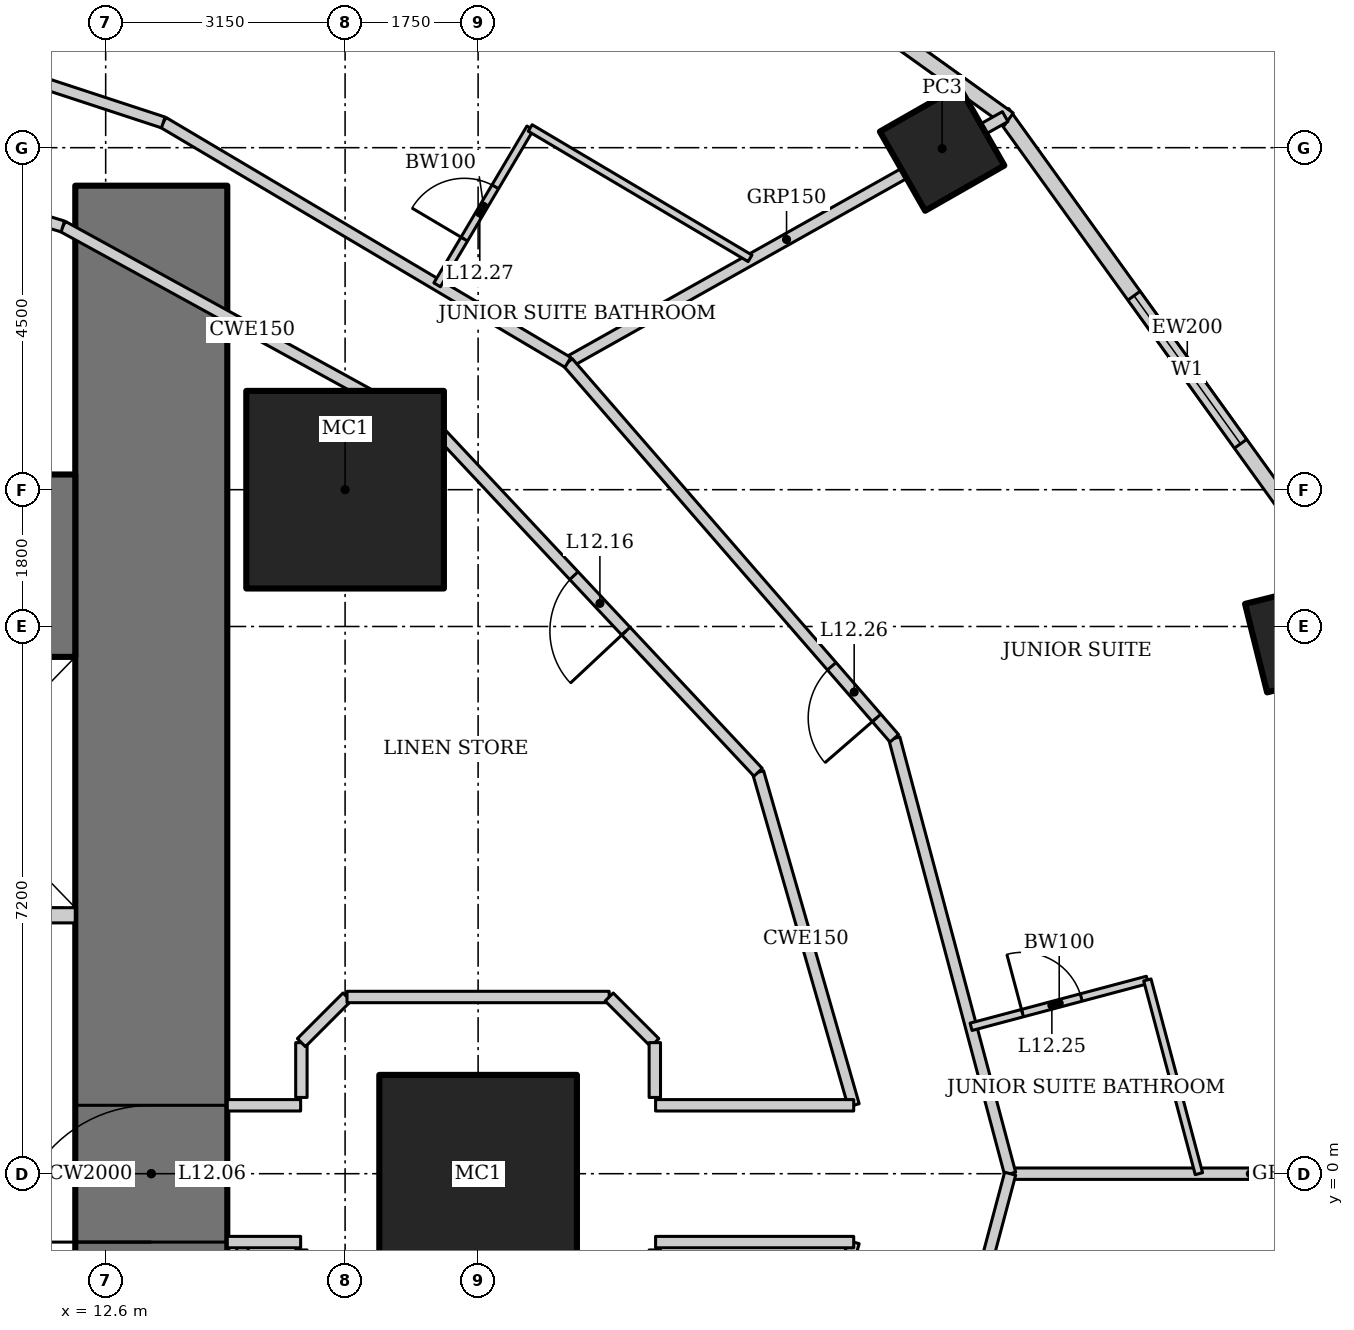
"""IFC4 building model, lengths in metres.
Left out: names, types, materials, properties, quantities, classifications, styles, units other than length and angle.
Written with IfcOpenShell. Run it as: python <this file> out.ifc"""

import sys

from ifc_helpers import new_model, si_unit, direction, frame, frame_2d, origin, origin_2d, place, context, subcontext, project, spatial, rectangle, hollow_rectangle, extrude, element, fill, save


model = new_model("IFC4")
c1 = context("Model", 3, precision=1e-05, world=origin(), true_north=direction((0.0, 1.0)))
c2 = subcontext(c1, "Body", "Model", "MODEL_VIEW")
j1 = project(units=[si_unit("LENGTHUNIT", "METRE"), si_unit("PLANEANGLEUNIT", "RADIAN")], contexts=[c1])
p1 = place(None, origin())
s1 = spatial("IfcSite", under=j1, at=p1, CompositionType="ELEMENT")
p2 = place(p1, origin())
s2 = spatial("IfcBuilding", under=s1, at=p2, CompositionType="ELEMENT")
p3 = place(p2, frame((0.0, 0.0, 58.6)))
s3 = spatial("IfcBuildingStorey", under=s2, at=p3, CompositionType="ELEMENT", Elevation=58.6)
for number, where, z_axis, x_axis in (
    (1, (17.5, 0.0, 0.0), (0.0, 0.0, 1.0), (1.0, 0.0, 0.0)),
    (2, (15.75, 9.0, 0.0), (0.0, 0.0, 1.0), (1.0, 0.0, 0.0)),
):
    element("IfcColumn", number, at=place(p3, frame(where, z_axis=z_axis, x_axis=x_axis)), inside=s3, PredefinedType="COLUMN", context=c2, shape_type="SweptSolid", body=[
        extrude(hollow_rectangle(XDim=2.6, YDim=2.6, WallThickness=0.13, at=origin_2d()), origin(), (0.0, 0.0, 1.0), 3.6),
    ])
p4 = place(p3, frame((28.318, 7.06, 0.0), z_axis=(0.0, 0.0, 1.0), x_axis=(0.970295726276, 0.2419218956, 0.0)))
e3 = element("IfcColumn", 3, at=p4, inside=s3, PredefinedType="COLUMN", context=c2, shape_type="SweptSolid", body=[
    extrude(hollow_rectangle(XDim=1.2, YDim=1.2, WallThickness=0.1, at=origin_2d()), origin(), (0.0, 0.0, 1.0), 3.6),
])
p5 = place(p3, frame((23.605, 13.489, 0.0), z_axis=(0.0, 0.0, 1.0), x_axis=(0.86824298017, 0.496139221777, 0.0)))
e4 = element("IfcColumn", 4, at=p5, inside=s3, PredefinedType="COLUMN", context=c2, shape_type="SweptSolid", body=[
    extrude(hollow_rectangle(XDim=1.2, YDim=1.2, WallThickness=0.12, at=origin_2d()), origin(), (0.0, 0.0, 1.0), 3.6),
])
p6 = place(p3, frame((13.2, -13.0, 0.0), z_axis=(0.0, 0.0, 1.0), x_axis=(0.0, 1.0, 0.0)))
e5 = element("IfcWall", 5, at=p6, inside=s3, PredefinedType="SHEAR", context=c2, shape_type="SweptSolid", body=[
    extrude(rectangle(XDim=26.0, YDim=2.0, at=frame_2d((13.0, 0.0))), origin(), (0.0, 0.0, 1.0), 3.6),
])
p7 = place(p6, frame((12.1, 0.0, 0.0)))
e6 = element("IfcOpeningElement", 6, at=p7, cuts=e5, PredefinedType="OPENING", context=c2, shape_type="SweptSolid", body=[
    extrude(rectangle(XDim=1.8, YDim=2.1, at=frame_2d((0.9, 1.05))), frame((0.0, 1.01, 0.0), z_axis=(0.0, -1.0, 0.0), x_axis=(1.0, 0.0, 0.0)), (0.0, 0.0, 1.0), 2.02),
])
p8 = place(p3, frame((12.2, 8.0, 0.0), z_axis=(0.0, 0.0, 1.0), x_axis=(-1.0, 0.0, 0.0)))
e7 = element("IfcWall", 7, at=p8, inside=s3, PredefinedType="SHEAR", context=c2, shape_type="SweptSolid", body=[
    extrude(rectangle(XDim=24.4, YDim=2.4, at=frame_2d((12.2, 0.0))), origin(), (0.0, 0.0, 1.0), 3.6),
])
p9 = place(p3, frame((12.2, 3.4, 0.0), z_axis=(0.0, 0.0, 1.0), x_axis=(-1.0, 0.0, 0.0)))
e8 = element("IfcWall", 8, at=p9, inside=s3, PredefinedType="SOLIDWALL", context=c2, shape_type="SweptSolid", body=[
    extrude(rectangle(XDim=6.6, YDim=0.2, at=frame_2d((3.3, 0.0))), origin(), (0.0, 0.0, 1.0), 3.6),
])
p10 = place(p9, frame((4.45, 0.0, 0.0)))
e9 = element("IfcOpeningElement", 9, at=p10, cuts=e8, PredefinedType="OPENING", context=c2, shape_type="SweptSolid", body=[
    extrude(rectangle(XDim=1.1, YDim=2.2, at=frame_2d((0.55, 1.1))), frame((0.0, 0.11, 0.0), z_axis=(0.0, -1.0, 0.0), x_axis=(1.0, 0.0, 0.0)), (0.0, 0.0, 1.0), 0.22),
])
p11 = place(p9, frame((0.9, 0.0, 0.0)))
e10 = element("IfcOpeningElement", 10, at=p11, cuts=e8, PredefinedType="OPENING", context=c2, shape_type="SweptSolid", body=[
    extrude(rectangle(XDim=1.4, YDim=2.2, at=frame_2d((0.7, 1.1))), frame((0.0, 0.11, 0.0), z_axis=(0.0, -1.0, 0.0), x_axis=(1.0, 0.0, 0.0)), (0.0, 0.0, 1.0), 0.22),
])
p12 = place(p3, frame((29.26, 7.2, 0.0), z_axis=(0.0, 0.0, 1.0), x_axis=(-0.583937613703, 0.811798536155, 0.0)))
e11 = element("IfcWall", 11, at=p12, inside=s3, PredefinedType="SOLIDWALL", context=c2, shape_type="SweptSolid", body=[
    extrude(rectangle(XDim=8.323, YDim=0.2, at=frame_2d((4.162, 0.0))), origin(), (0.0, 0.0, 1.0), 3.45),
])
p13 = place(p12, frame((2.961, 0.0, 0.5)))
e12 = element("IfcOpeningElement", 12, at=p13, cuts=e11, PredefinedType="OPENING", context=c2, shape_type="SweptSolid", body=[
    extrude(rectangle(XDim=2.4, YDim=2.2, at=frame_2d((1.2, 1.1))), frame((0.0, 0.11, 0.0), z_axis=(0.0, -1.0, 0.0), x_axis=(1.0, 0.0, 0.0)), (0.0, 0.0, 1.0), 0.22),
])
p14 = place(p3, frame((24.482, 13.875, 0.0), z_axis=(0.0, 0.0, 1.0), x_axis=(-0.812791321576, 0.582554948112, 0.0)))
e13 = element("IfcWall", 13, at=p14, inside=s3, PredefinedType="SOLIDWALL", context=c2, shape_type="SweptSolid", body=[
    extrude(rectangle(XDim=8.063, YDim=0.2, at=frame_2d((4.032, 0.0))), origin(), (0.0, 0.0, 1.0), 3.45),
])
p15 = place(p14, frame((2.832, 0.0, 0.5)))
e14 = element("IfcOpeningElement", 14, at=p15, cuts=e13, PredefinedType="OPENING", context=c2, shape_type="SweptSolid", body=[
    extrude(rectangle(XDim=2.4, YDim=2.2, at=frame_2d((1.2, 1.1))), frame((0.0, 0.11, 0.0), z_axis=(0.0, -1.0, 0.0), x_axis=(1.0, 0.0, 0.0)), (0.0, 0.0, 1.0), 0.22),
])
p16 = place(p3, frame((30.821, 0.0, 0.0), z_axis=(0.0, 0.0, 1.0), x_axis=(-1.0, 0.0, 0.0)))
e15 = element("IfcWall", 15, at=p16, inside=s3, PredefinedType="PARTITIONING", context=c2, shape_type="SweptSolid", body=[
    extrude(rectangle(XDim=6.321, YDim=0.15, at=frame_2d((3.16, 0.0))), origin(), (0.0, 0.0, 1.0), 2.528),
])
p17 = place(p3, frame((24.435, 13.909, 0.0), z_axis=(0.0, 0.0, 1.0), x_axis=(-0.871747379892, -0.489955616001, 0.0)))
e16 = element("IfcWall", 16, at=p17, inside=s3, PredefinedType="PARTITIONING", context=c2, shape_type="SweptSolid", body=[
    extrude(rectangle(XDim=6.6, YDim=0.15, at=frame_2d((3.3, 0.0))), origin(), (0.0, 0.0, 1.0), 2.693),
])
p18 = place(p3, frame((24.5, 0.0, 0.0), z_axis=(0.0, 0.0, 1.0), x_axis=(-0.257083265334, 0.966389256296, 0.0)))
e17 = element("IfcWall", 17, at=p18, inside=s3, PredefinedType="PARTITIONING", context=c2, shape_type="SweptSolid", body=[
    extrude(rectangle(XDim=5.928, YDim=0.15, at=frame_2d((2.964, 0.0))), origin(), (0.0, 0.0, 1.0), 3.45),
])
p19 = place(p3, frame((22.976, 5.729, 0.0), z_axis=(0.0, 0.0, 1.0), x_axis=(-0.655599989166, 0.755108372491, 0.0)))
e18 = element("IfcWall", 18, at=p19, inside=s3, PredefinedType="PARTITIONING", context=c2, shape_type="SweptSolid", body=[
    extrude(rectangle(XDim=6.551, YDim=0.15, at=frame_2d((3.275, 0.0))), origin(), (0.0, 0.0, 1.0), 3.45),
])
p20 = place(p19, frame((0.356, 0.0, 0.0)))
e19 = element("IfcOpeningElement", 19, at=p20, cuts=e18, PredefinedType="OPENING", context=c2, shape_type="SweptSolid", body=[
    extrude(rectangle(XDim=0.9, YDim=2.1, at=frame_2d((0.45, 1.05))), frame((0.0, 0.085, 0.0), z_axis=(0.0, -1.0, 0.0), x_axis=(1.0, 0.0, 0.0)), (0.0, 0.0, 1.0), 0.17),
])
p21 = place(p3, frame((18.681, 10.675, 0.0), z_axis=(0.0, 0.0, 1.0), x_axis=(-0.860147339762, 0.510045639036, 0.0)))
e20 = element("IfcWall", 20, at=p21, inside=s3, PredefinedType="PARTITIONING", context=c2, shape_type="SweptSolid", body=[
    extrude(rectangle(XDim=6.19, YDim=0.15, at=frame_2d((3.095, 0.0))), origin(), (0.0, 0.0, 1.0), 3.45),
])
p22 = place(p3, frame((13.357, 13.832, 0.0), z_axis=(0.0, 0.0, 1.0), x_axis=(-0.950106803111, 0.311924770869, 0.0)))
e21 = element("IfcWall", 21, at=p22, inside=s3, PredefinedType="PARTITIONING", context=c2, shape_type="SweptSolid", body=[
    extrude(rectangle(XDim=5.689, YDim=0.15, at=frame_2d((2.845, 0.0))), origin(), (0.0, 0.0, 1.0), 3.45),
])
p23 = place(p22, frame((4.639, 0.0, 0.0)))
e22 = element("IfcOpeningElement", 22, at=p23, cuts=e21, PredefinedType="OPENING", context=c2, shape_type="SweptSolid", body=[
    extrude(rectangle(XDim=0.9, YDim=2.1, at=frame_2d((0.45, 1.05))), frame((0.0, 0.085, 0.0), z_axis=(0.0, -1.0, 0.0), x_axis=(1.0, 0.0, 0.0)), (0.0, 0.0, 1.0), 0.17),
])
p24 = place(p3, frame((22.976, -5.729, 0.0), z_axis=(0.0, 0.0, 1.0), x_axis=(0.257083265334, 0.966389256296, 0.0)))
e23 = element("IfcWall", 23, at=p24, inside=s3, PredefinedType="PARTITIONING", context=c2, shape_type="SweptSolid", body=[
    extrude(rectangle(XDim=5.928, YDim=0.15, at=frame_2d((2.964, 0.0))), origin(), (0.0, 0.0, 1.0), 3.45),
])
p25 = place(p24, frame((1.794, 0.0, 0.0)))
e24 = element("IfcOpeningElement", 24, at=p25, cuts=e23, PredefinedType="OPENING", context=c2, shape_type="SweptSolid", body=[
    extrude(rectangle(XDim=0.9, YDim=2.1, at=frame_2d((0.45, 1.05))), frame((0.0, 0.085, 0.0), z_axis=(0.0, -1.0, 0.0), x_axis=(1.0, 0.0, 0.0)), (0.0, 0.0, 1.0), 0.17),
])
p26 = place(p3, frame((22.442, 0.9, 0.0), z_axis=(0.0, 0.0, 1.0), x_axis=(-0.27585972825, 0.961197903831, 0.0)))
e25 = element("IfcWall", 25, at=p26, inside=s3, PredefinedType="PARTITIONING", context=c2, shape_type="SweptSolid", body=[
    extrude(rectangle(XDim=4.559, YDim=0.15, at=frame_2d((2.279, 0.0))), origin(), (0.0, 0.0, 1.0), 3.45),
])
p27 = place(p3, frame((21.184, 5.282, 0.0), z_axis=(0.0, 0.0, 1.0), x_axis=(-0.68365836236, 0.729802194828, 0.0)))
e26 = element("IfcWall", 26, at=p27, inside=s3, PredefinedType="PARTITIONING", context=c2, shape_type="SweptSolid", body=[
    extrude(rectangle(XDim=6.09, YDim=0.15, at=frame_2d((3.045, 0.0))), origin(), (0.0, 0.0, 1.0), 3.45),
])
p28 = place(p27, frame((2.545, 0.0, 0.0)))
e27 = element("IfcOpeningElement", 27, at=p28, cuts=e26, PredefinedType="OPENING", context=c2, shape_type="SweptSolid", body=[
    extrude(rectangle(XDim=1.0, YDim=2.1, at=frame_2d((0.5, 1.05))), frame((0.0, 0.085, 0.0), z_axis=(0.0, -1.0, 0.0), x_axis=(1.0, 0.0, 0.0)), (0.0, 0.0, 1.0), 0.17),
])
p29 = place(p3, frame((17.021, 9.726, 0.0), z_axis=(0.0, 0.0, 1.0), x_axis=(-0.876522084062, 0.481361647986, 0.0)))
e28 = element("IfcWall", 28, at=p29, inside=s3, PredefinedType="PARTITIONING", context=c2, shape_type="SweptSolid", body=[
    extrude(rectangle(XDim=5.687, YDim=0.15, at=frame_2d((2.844, 0.0))), origin(), (0.0, 0.0, 1.0), 3.45),
])
p30 = place(p3, frame((12.036, 12.464, 0.0), z_axis=(0.0, 0.0, 1.0), x_axis=(-0.956795045135, 0.290763205385, 0.0)))
e29 = element("IfcWall", 29, at=p30, inside=s3, PredefinedType="PARTITIONING", context=c2, shape_type="SweptSolid", body=[
    extrude(rectangle(XDim=5.146, YDim=0.15, at=frame_2d((2.573, 0.0))), origin(), (0.0, 0.0, 1.0), 3.45),
])
p31 = place(p30, frame((0.816, 0.0, 0.0)))
e30 = element("IfcOpeningElement", 30, at=p31, cuts=e29, PredefinedType="OPENING", context=c2, shape_type="SweptSolid", body=[
    extrude(rectangle(XDim=0.9, YDim=2.1, at=frame_2d((0.45, 1.05))), frame((0.0, 0.085, 0.0), z_axis=(0.0, -1.0, 0.0), x_axis=(1.0, 0.0, 0.0)), (0.0, 0.0, 1.0), 0.17),
])
p32 = place(p3, frame((21.184, -5.282, 0.0), z_axis=(0.0, 0.0, 1.0), x_axis=(0.27585972825, 0.961197903831, 0.0)))
e31 = element("IfcWall", 31, at=p32, inside=s3, PredefinedType="PARTITIONING", context=c2, shape_type="SweptSolid", body=[
    extrude(rectangle(XDim=4.559, YDim=0.15, at=frame_2d((2.279, 0.0))), origin(), (0.0, 0.0, 1.0), 3.45),
])
p33 = place(p3, frame((14.4, -11.017, 0.0), z_axis=(0.0, 0.0, 1.0), x_axis=(0.0, 1.0, 0.0)))
e32 = element("IfcWall", 32, at=p33, inside=s3, PredefinedType="PARTITIONING", context=c2, shape_type="SweptSolid", body=[
    extrude(rectangle(XDim=10.117, YDim=0.15, at=frame_2d((5.059, 0.0))), origin(), (0.0, 0.0, 1.0), 3.45),
])
p34 = place(p3, frame((23.986, 1.933, 0.0), z_axis=(0.0, 0.0, 1.0), x_axis=(0.96639514992, 0.257061109879, 0.0)))
e33 = element("IfcWall", 33, at=p34, inside=s3, PredefinedType="PARTITIONING", context=c2, shape_type="SweptSolid", body=[
    extrude(rectangle(XDim=2.4, YDim=0.1, at=frame_2d((1.2, 0.0))), origin(), (0.0, 0.0, 1.0), 3.45),
])
p35 = place(p34, frame((0.7, 0.0, 0.0)))
e34 = element("IfcOpeningElement", 34, at=p35, cuts=e33, PredefinedType="OPENING", context=c2, shape_type="SweptSolid", body=[
    extrude(rectangle(XDim=0.8, YDim=2.1, at=frame_2d((0.4, 1.05))), frame((0.0, 0.06, 0.0), z_axis=(0.0, -1.0, 0.0), x_axis=(1.0, 0.0, 0.0)), (0.0, 0.0, 1.0), 0.12),
])
p36 = place(p3, frame((26.305, 2.55, 0.0), z_axis=(0.0, 0.0, 1.0), x_axis=(0.257052122515, -0.966397540513, 0.0)))
e35 = element("IfcWall", 35, at=p36, inside=s3, PredefinedType="PARTITIONING", context=c2, shape_type="SweptSolid", body=[
    extrude(rectangle(XDim=2.638, YDim=0.1, at=frame_2d((1.319, 0.0))), origin(), (0.0, 0.0, 1.0), 3.45),
])
p37 = place(p3, frame((16.961, 11.695, 0.0), z_axis=(0.0, 0.0, 1.0), x_axis=(0.510075642074, 0.860129548012, 0.0)))
e36 = element("IfcWall", 36, at=p37, inside=s3, PredefinedType="PARTITIONING", context=c2, shape_type="SweptSolid", body=[
    extrude(rectangle(XDim=2.4, YDim=0.1, at=frame_2d((1.2, 0.0))), origin(), (0.0, 0.0, 1.0), 3.45),
])
p38 = place(p37, frame((0.7, 0.0, 0.0)))
e37 = element("IfcOpeningElement", 37, at=p38, cuts=e36, PredefinedType="OPENING", context=c2, shape_type="SweptSolid", body=[
    extrude(rectangle(XDim=0.8, YDim=2.1, at=frame_2d((0.4, 1.05))), frame((0.0, 0.06, 0.0), z_axis=(0.0, -1.0, 0.0), x_axis=(1.0, 0.0, 0.0)), (0.0, 0.0, 1.0), 0.12),
])
p39 = place(p3, frame((18.185, 13.76, 0.0), z_axis=(0.0, 0.0, 1.0), x_axis=(0.860146437071, -0.510047161343, 0.0)))
e38 = element("IfcWall", 38, at=p39, inside=s3, PredefinedType="PARTITIONING", context=c2, shape_type="SweptSolid", body=[
    extrude(rectangle(XDim=3.363, YDim=0.1, at=frame_2d((1.681, 0.0))), origin(), (0.0, 0.0, 1.0), 3.45),
])
p40 = place(p3, frame((14.2, -0.9, 0.0), z_axis=(0.0, 0.0, 1.0), x_axis=(1.0, 0.0, 0.0)))
e39 = element("IfcWall", 39, at=p40, inside=s3, PredefinedType="PARTITIONING", context=c2, shape_type="SweptSolid", body=[
    extrude(rectangle(XDim=0.965, YDim=0.15, at=frame_2d((0.482, 0.0))), origin(), (0.0, 0.0, 1.0), 3.45),
])
p41 = place(p3, frame((19.835, -0.9, 0.0), z_axis=(0.0, 0.0, 1.0), x_axis=(1.0, 0.0, 0.0)))
e40 = element("IfcWall", 40, at=p41, inside=s3, PredefinedType="PARTITIONING", context=c2, shape_type="SweptSolid", body=[
    extrude(rectangle(XDim=2.607, YDim=0.15, at=frame_2d((1.303, 0.0))), origin(), (0.0, 0.0, 1.0), 3.45),
])
p42 = place(p3, frame((14.2, 0.9, 0.0), z_axis=(0.0, 0.0, 1.0), x_axis=(1.0, 0.0, 0.0)))
e41 = element("IfcWall", 41, at=p42, inside=s3, PredefinedType="PARTITIONING", context=c2, shape_type="SweptSolid", body=[
    extrude(rectangle(XDim=0.965, YDim=0.15, at=frame_2d((0.482, 0.0))), origin(), (0.0, 0.0, 1.0), 3.45),
])
p43 = place(p3, frame((19.835, 0.9, 0.0), z_axis=(0.0, 0.0, 1.0), x_axis=(1.0, 0.0, 0.0)))
e42 = element("IfcWall", 42, at=p43, inside=s3, PredefinedType="PARTITIONING", context=c2, shape_type="SweptSolid", body=[
    extrude(rectangle(XDim=2.607, YDim=0.15, at=frame_2d((1.303, 0.0))), origin(), (0.0, 0.0, 1.0), 3.45),
])
p44 = place(p3, frame((15.175, 1.003, 0.0), z_axis=(0.0, 0.0, 1.0), x_axis=(0.0, 1.0, 0.0)))
e43 = element("IfcWall", 43, at=p44, inside=s3, PredefinedType="PARTITIONING", context=c2, shape_type="SweptSolid", body=[
    extrude(rectangle(XDim=0.721, YDim=0.15, at=frame_2d((0.361, 0.0))), origin(), (0.0, 0.0, 1.0), 3.45),
])
p45 = place(p3, frame((15.175, 1.725, 0.0), z_axis=(0.0, 0.0, 1.0), x_axis=(0.707106781187, 0.707106781187, 0.0)))
e44 = element("IfcWall", 44, at=p45, inside=s3, PredefinedType="PARTITIONING", context=c2, shape_type="SweptSolid", body=[
    extrude(rectangle(XDim=0.849, YDim=0.15, at=frame_2d((0.425, 0.0))), origin(), (0.0, 0.0, 1.0), 3.45),
])
p46 = place(p3, frame((15.775, 2.325, 0.0), z_axis=(0.0, 0.0, 1.0), x_axis=(1.0, 0.0, 0.0)))
e45 = element("IfcWall", 45, at=p46, inside=s3, PredefinedType="PARTITIONING", context=c2, shape_type="SweptSolid", body=[
    extrude(rectangle(XDim=3.449, YDim=0.15, at=frame_2d((1.725, 0.0))), origin(), (0.0, 0.0, 1.0), 3.45),
])
p47 = place(p3, frame((19.225, 2.325, 0.0), z_axis=(0.0, 0.0, 1.0), x_axis=(0.707106781187, -0.707106781187, 0.0)))
e46 = element("IfcWall", 46, at=p47, inside=s3, PredefinedType="PARTITIONING", context=c2, shape_type="SweptSolid", body=[
    extrude(rectangle(XDim=0.849, YDim=0.15, at=frame_2d((0.425, 0.0))), origin(), (0.0, 0.0, 1.0), 3.45),
])
p48 = place(p3, frame((19.825, 1.725, 0.0), z_axis=(0.0, 0.0, 1.0), x_axis=(0.0, -1.0, 0.0)))
e47 = element("IfcWall", 47, at=p48, inside=s3, PredefinedType="PARTITIONING", context=c2, shape_type="SweptSolid", body=[
    extrude(rectangle(XDim=0.721, YDim=0.15, at=frame_2d((0.361, 0.0))), origin(), (0.0, 0.0, 1.0), 3.45),
])
p49 = place(p13, origin())
e48 = element("IfcWindow", 48, at=p49, inside=s3, PartitioningType="SINGLE_PANEL", PredefinedType="WINDOW", context=c2, shape_type="SweptSolid", body=[
    extrude(rectangle(XDim=2.4, YDim=2.2, at=frame_2d((1.2, 1.1))), frame((0.0, 0.03, 0.0), z_axis=(0.0, -1.0, 0.0), x_axis=(1.0, 0.0, 0.0)), (0.0, 0.0, 1.0), 0.06),
])
fill(e12, e48)
p50 = place(p7, origin())
e49 = element("IfcDoor", 49, at=p50, inside=s3, OperationType="DOUBLE_DOOR_DOUBLE_SWING", PredefinedType="DOOR", context=c2, shape_type="SweptSolid", body=[
    extrude(rectangle(XDim=1.8, YDim=2.1, at=frame_2d((0.9, 1.05))), frame((0.0, 0.025, 0.0), z_axis=(0.0, -1.0, 0.0), x_axis=(1.0, 0.0, 0.0)), (0.0, 0.0, 1.0), 0.05),
])
fill(e6, e49)
p51 = place(p28, origin())
e50 = element("IfcDoor", 50, at=p51, inside=s3, OperationType="SINGLE_SWING_LEFT", PredefinedType="DOOR", context=c2, shape_type="SweptSolid", body=[
    extrude(rectangle(XDim=1.0, YDim=2.1, at=frame_2d((0.5, 1.05))), frame((0.0, 0.025, 0.0), z_axis=(0.0, -1.0, 0.0), x_axis=(1.0, 0.0, 0.0)), (0.0, 0.0, 1.0), 0.05),
])
fill(e27, e50)
p52 = place(p35, origin())
e51 = element("IfcDoor", 51, at=p52, inside=s3, OperationType="SINGLE_SWING_LEFT", PredefinedType="DOOR", context=c2, shape_type="SweptSolid", body=[
    extrude(rectangle(XDim=0.8, YDim=2.1, at=frame_2d((0.4, 1.05))), frame((0.0, 0.025, 0.0), z_axis=(0.0, -1.0, 0.0), x_axis=(1.0, 0.0, 0.0)), (0.0, 0.0, 1.0), 0.05),
])
fill(e34, e51)
p53 = place(p20, origin())
e52 = element("IfcDoor", 52, at=p53, inside=s3, OperationType="SINGLE_SWING_LEFT", PredefinedType="DOOR", context=c2, shape_type="SweptSolid", body=[
    extrude(rectangle(XDim=0.9, YDim=2.1, at=frame_2d((0.45, 1.05))), frame((0.0, 0.025, 0.0), z_axis=(0.0, -1.0, 0.0), x_axis=(1.0, 0.0, 0.0)), (0.0, 0.0, 1.0), 0.05),
])
fill(e19, e52)
p54 = place(p38, origin())
e53 = element("IfcDoor", 53, at=p54, inside=s3, OperationType="SINGLE_SWING_LEFT", PredefinedType="DOOR", context=c2, shape_type="SweptSolid", body=[
    extrude(rectangle(XDim=0.8, YDim=2.1, at=frame_2d((0.4, 1.05))), frame((0.0, 0.025, 0.0), z_axis=(0.0, -1.0, 0.0), x_axis=(1.0, 0.0, 0.0)), (0.0, 0.0, 1.0), 0.05),
])
fill(e37, e53)
save(model, sys.argv[1])
